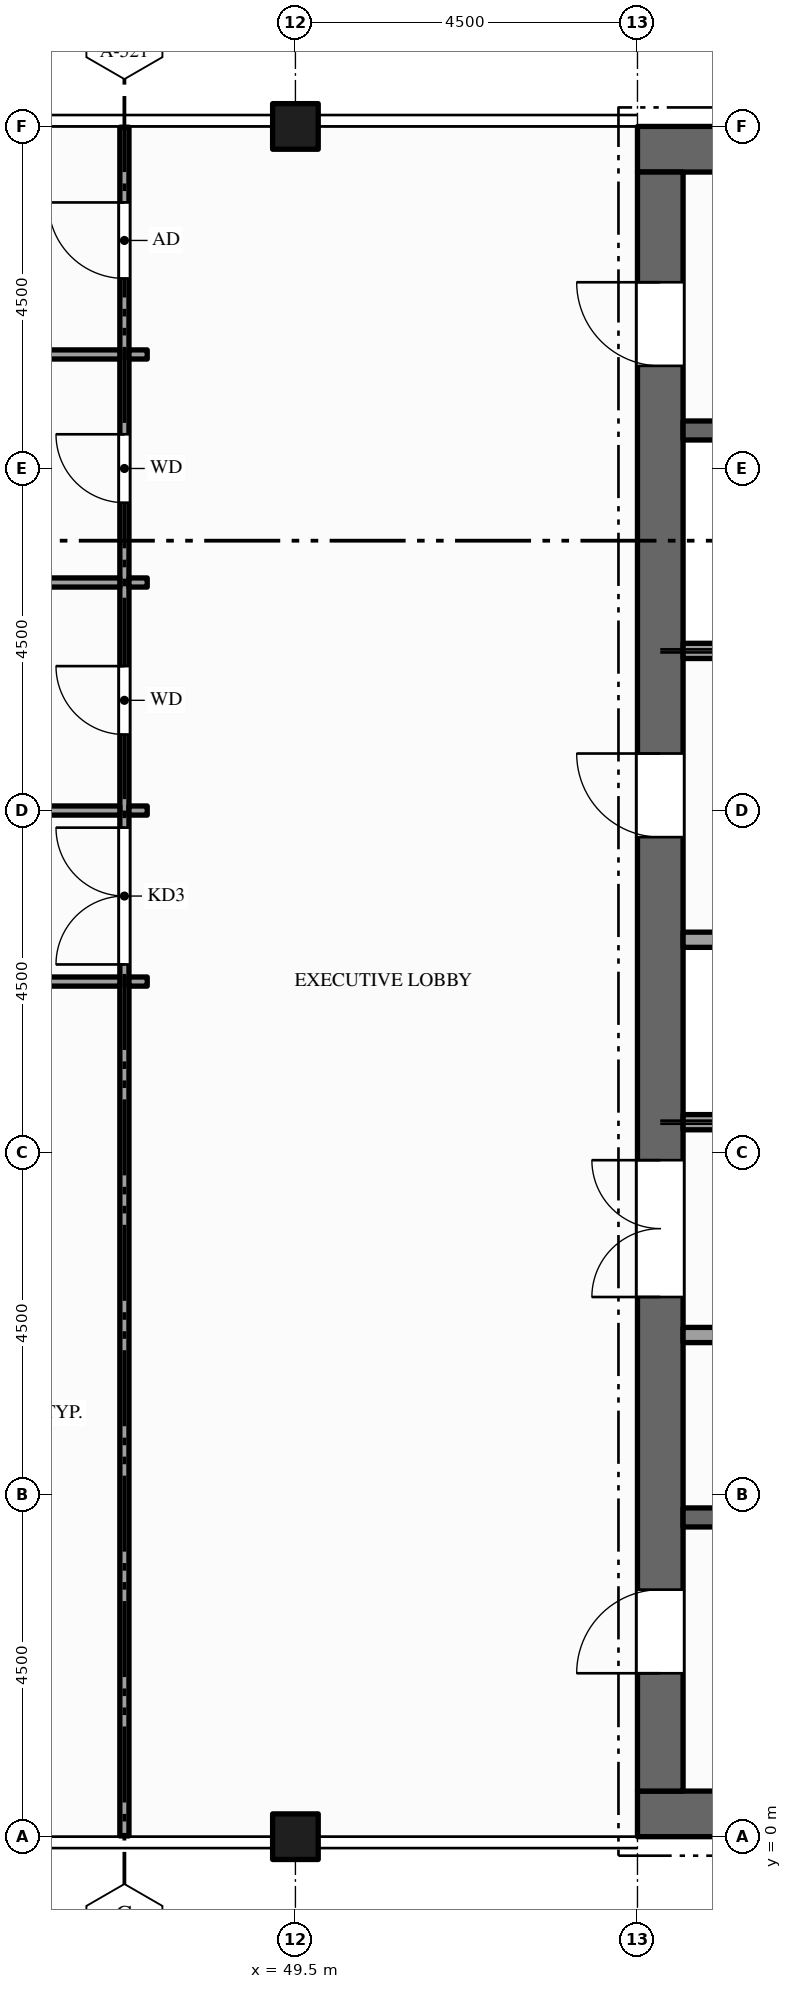
"""IFC4 building model, lengths in metres.
Left out: names, types, materials, properties, quantities, classifications, styles, units other than length and angle.
Written with IfcOpenShell. Run it as: python <this file> out.ifc"""

import sys

from ifc_helpers import new_model, si_unit, direction, frame, frame_2d, origin, origin_2d, place, context, subcontext, project, spatial, rectangle, hollow_rectangle, extrude, element, fill, save


model = new_model("IFC4")
c1 = context("Model", 3, precision=1e-05, world=origin(), true_north=direction((0.0, 1.0)))
c2 = subcontext(c1, "Body", "Model", "MODEL_VIEW")
j1 = project(units=[si_unit("LENGTHUNIT", "METRE"), si_unit("PLANEANGLEUNIT", "RADIAN")], contexts=[c1])
p1 = place(None, origin())
s1 = spatial("IfcSite", under=j1, at=p1, CompositionType="ELEMENT")
p2 = place(p1, origin())
s2 = spatial("IfcBuilding", under=s1, at=p2, CompositionType="ELEMENT")
p3 = place(p2, frame((0.0, 0.0, 318.5)))
s3 = spatial("IfcBuildingStorey", under=s2, at=p3, CompositionType="ELEMENT", Elevation=318.5)
for number, where, z_axis, x_axis in (
    (1, (67.5, 0.3, -0.15), (0.0, 0.0, 1.0), (-1.0, 0.0, 0.0)),
    (2, (54.0, 22.2, -0.15), (0.0, 0.0, 1.0), (1.0, 0.0, 0.0)),
):
    element("IfcWall", number, at=place(p3, frame(where, z_axis=z_axis, x_axis=x_axis)), inside=s3, PredefinedType="SHEAR", context=c2, shape_type="SweptSolid", body=[
        extrude(rectangle(XDim=13.5, YDim=0.6, at=frame_2d((6.75, 0.0))), origin(), (0.0, 0.0, 1.0), 4.5),
    ])
p4 = place(p3, frame((54.3, 0.6, -0.15), z_axis=(0.0, 0.0, 1.0), x_axis=(0.0, 1.0, 0.0)))
e3 = element("IfcWall", 3, at=p4, inside=s3, PredefinedType="SHEAR", context=c2, shape_type="SweptSolid", body=[
    extrude(rectangle(XDim=21.3, YDim=0.6, at=frame_2d((10.65, 0.0))), origin(), (0.0, 0.0, 1.0), 4.5),
])
p5 = place(p4, frame((6.5, 0.0, 0.15)))
e4 = element("IfcOpeningElement", 4, at=p5, cuts=e3, PredefinedType="OPENING", context=c2, shape_type="SweptSolid", body=[
    extrude(rectangle(XDim=1.8, YDim=2.1, at=frame_2d((0.9, 1.05))), frame((0.0, 0.31, 0.0), z_axis=(0.0, -1.0, 0.0), x_axis=(1.0, 0.0, 0.0)), (0.0, 0.0, 1.0), 0.62),
])
p6 = place(p4, frame((12.55, 0.0, 0.15)))
e5 = element("IfcOpeningElement", 5, at=p6, cuts=e3, PredefinedType="OPENING", context=c2, shape_type="SweptSolid", body=[
    extrude(rectangle(XDim=1.1, YDim=2.1, at=frame_2d((0.55, 1.05))), frame((0.0, 0.31, 0.0), z_axis=(0.0, -1.0, 0.0), x_axis=(1.0, 0.0, 0.0)), (0.0, 0.0, 1.0), 0.62),
])
p7 = place(p4, frame((1.55, 0.0, 0.15)))
e6 = element("IfcOpeningElement", 6, at=p7, cuts=e3, PredefinedType="OPENING", context=c2, shape_type="SweptSolid", body=[
    extrude(rectangle(XDim=1.1, YDim=2.1, at=frame_2d((0.55, 1.05))), frame((0.0, 0.31, 0.0), z_axis=(0.0, -1.0, 0.0), x_axis=(1.0, 0.0, 0.0)), (0.0, 0.0, 1.0), 0.62),
])
p8 = place(p4, frame((18.75, 0.0, 0.15)))
e7 = element("IfcOpeningElement", 7, at=p8, cuts=e3, PredefinedType="OPENING", context=c2, shape_type="SweptSolid", body=[
    extrude(rectangle(XDim=1.1, YDim=2.1, at=frame_2d((0.55, 1.05))), frame((0.0, 0.31, 0.0), z_axis=(0.0, -1.0, 0.0), x_axis=(1.0, 0.0, 0.0)), (0.0, 0.0, 1.0), 0.62),
])
for number, where, z_axis, x_axis in (
    (8, (49.5, 0.0, -0.15), (0.0, 0.0, 1.0), (1.0, 0.0, 0.0)),
    (9, (49.5, 22.5, -0.15), (0.0, 0.0, 1.0), (1.0, 0.0, 0.0)),
):
    element("IfcColumn", number, at=place(p3, frame(where, z_axis=z_axis, x_axis=x_axis)), inside=s3, PredefinedType="COLUMN", context=c2, shape_type="SweptSolid", body=[
        extrude(hollow_rectangle(XDim=0.6, YDim=0.6, WallThickness=0.03, at=origin_2d()), origin(), (0.0, 0.0, 1.0), 4.5),
    ])
p9 = place(p3, frame((47.25, 0.01, 0.0), z_axis=(0.0, 0.0, 1.0), x_axis=(0.0, 1.0, 0.0)))
e10 = element("IfcWall", 10, at=p9, inside=s3, PredefinedType="PARTITIONING", context=c2, shape_type="SweptSolid", body=[
    extrude(rectangle(XDim=22.48, YDim=0.12, at=frame_2d((11.24, 0.0))), origin(), (0.0, 0.0, 1.0), 3.359),
])
p10 = place(p9, frame((11.465, 0.0, 0.0)))
e11 = element("IfcOpeningElement", 11, at=p10, cuts=e10, PredefinedType="OPENING", context=c2, shape_type="SweptSolid", body=[
    extrude(rectangle(XDim=1.8, YDim=2.1, at=frame_2d((0.9, 1.05))), frame((0.0, 0.07, 0.0), z_axis=(0.0, -1.0, 0.0), x_axis=(1.0, 0.0, 0.0)), (0.0, 0.0, 1.0), 0.14),
])
p11 = place(p9, frame((14.49, 0.0, 0.0)))
e12 = element("IfcOpeningElement", 12, at=p11, cuts=e10, PredefinedType="OPENING", context=c2, shape_type="SweptSolid", body=[
    extrude(rectangle(XDim=0.9, YDim=2.1, at=frame_2d((0.45, 1.05))), frame((0.0, 0.07, 0.0), z_axis=(0.0, -1.0, 0.0), x_axis=(1.0, 0.0, 0.0)), (0.0, 0.0, 1.0), 0.14),
])
p12 = place(p9, frame((17.54, 0.0, 0.0)))
e13 = element("IfcOpeningElement", 13, at=p12, cuts=e10, PredefinedType="OPENING", context=c2, shape_type="SweptSolid", body=[
    extrude(rectangle(XDim=0.9, YDim=2.1, at=frame_2d((0.45, 1.05))), frame((0.0, 0.07, 0.0), z_axis=(0.0, -1.0, 0.0), x_axis=(1.0, 0.0, 0.0)), (0.0, 0.0, 1.0), 0.14),
])
p13 = place(p9, frame((20.49, 0.0, 0.0)))
e14 = element("IfcOpeningElement", 14, at=p13, cuts=e10, PredefinedType="OPENING", context=c2, shape_type="SweptSolid", body=[
    extrude(rectangle(XDim=1.0, YDim=2.1, at=frame_2d((0.5, 1.05))), frame((0.0, 0.07, 0.0), z_axis=(0.0, -1.0, 0.0), x_axis=(1.0, 0.0, 0.0)), (0.0, 0.0, 1.0), 0.14),
])
p14 = place(p3, frame((54.6, 4.2, 0.0), z_axis=(0.0, 0.0, 1.0), x_axis=(1.0, 0.0, 0.0)))
e15 = element("IfcWall", 15, at=p14, inside=s3, PredefinedType="SHEAR", context=c2, shape_type="SweptSolid", body=[
    extrude(rectangle(XDim=6.675, YDim=0.25, at=frame_2d((3.337, 0.0))), origin(), (0.0, 0.0, 1.0), 4.35),
])
p15 = place(p3, frame((54.6, 6.6, 0.0), z_axis=(0.0, 0.0, 1.0), x_axis=(1.0, 0.0, 0.0)))
e16 = element("IfcWall", 16, at=p15, inside=s3, PredefinedType="PARTITIONING", context=c2, shape_type="SweptSolid", body=[
    extrude(rectangle(XDim=2.7, YDim=0.2, at=frame_2d((1.35, 0.0))), origin(), (0.0, 0.0, 1.0), 4.35),
])
p16 = place(p15, frame((0.9, 0.0, 0.0)))
e17 = element("IfcOpeningElement", 17, at=p16, cuts=e16, PredefinedType="OPENING", context=c2, shape_type="SweptSolid", body=[
    extrude(rectangle(XDim=0.9, YDim=2.1, at=frame_2d((0.45, 1.05))), frame((0.0, 0.11, 0.0), z_axis=(0.0, -1.0, 0.0), x_axis=(1.0, 0.0, 0.0)), (0.0, 0.0, 1.0), 0.22),
])
p17 = place(p3, frame((54.6, 9.4, 0.0), z_axis=(0.0, 0.0, 1.0), x_axis=(1.0, 0.0, 0.0)))
e18 = element("IfcWall", 18, at=p17, inside=s3, PredefinedType="SOLIDWALL", context=c2, shape_type="SweptSolid", body=[
    extrude(rectangle(XDim=2.7, YDim=0.2, at=frame_2d((1.35, 0.0))), origin(), (0.0, 0.0, 1.0), 4.35),
])
p18 = place(p17, frame((0.8, 0.0, 0.012)))
e19 = element("IfcOpeningElement", 19, at=p18, cuts=e18, PredefinedType="OPENING", context=c2, shape_type="SweptSolid", body=[
    extrude(rectangle(XDim=1.1, YDim=2.1, at=frame_2d((0.55, 1.05))), frame((0.0, 0.11, 0.0), z_axis=(0.0, -1.0, 0.0), x_axis=(1.0, 0.0, 0.0)), (0.0, 0.0, 1.0), 0.22),
])
p19 = place(p3, frame((38.31, 11.25, 0.0), z_axis=(0.0, 0.0, 1.0), x_axis=(1.0, 0.0, 0.0)))
e20 = element("IfcWall", 20, at=p19, inside=s3, PredefinedType="PARTITIONING", context=c2, shape_type="SweptSolid", body=[
    extrude(rectangle(XDim=8.88, YDim=0.12, at=frame_2d((4.44, 0.0))), origin(), (0.0, 0.0, 1.0), 3.359),
])
p20 = place(p19, frame((3.84, 0.0, 0.0)))
e21 = element("IfcOpeningElement", 21, at=p20, cuts=e20, PredefinedType="OPENING", context=c2, shape_type="SweptSolid", body=[
    extrude(rectangle(XDim=1.2, YDim=2.1, at=frame_2d((0.6, 1.05))), frame((0.0, 0.07, 0.0), z_axis=(0.0, -1.0, 0.0), x_axis=(1.0, 0.0, 0.0)), (0.0, 0.0, 1.0), 0.14),
])
p21 = place(p3, frame((47.31, 11.25, 0.0), z_axis=(0.0, 0.0, 1.0), x_axis=(1.0, 0.0, 0.0)))
e22 = element("IfcWall", 22, at=p21, inside=s3, PredefinedType="PARTITIONING", context=c2, shape_type="SweptSolid", body=[
    extrude(rectangle(XDim=0.24, YDim=0.12, at=frame_2d((0.12, 0.0))), origin(), (0.0, 0.0, 1.0), 3.359),
])
p22 = place(p3, frame((54.6, 11.8, 0.0), z_axis=(0.0, 0.0, 1.0), x_axis=(1.0, 0.0, 0.0)))
e23 = element("IfcWall", 23, at=p22, inside=s3, PredefinedType="SOLIDWALL", context=c2, shape_type="SweptSolid", body=[
    extrude(rectangle(XDim=2.7, YDim=0.2, at=frame_2d((1.35, 0.0))), origin(), (0.0, 0.0, 1.0), 4.35),
])
p23 = place(p3, frame((42.81, 13.5, 0.0), z_axis=(0.0, 0.0, 1.0), x_axis=(1.0, 0.0, 0.0)))
e24 = element("IfcWall", 24, at=p23, inside=s3, PredefinedType="PARTITIONING", context=c2, shape_type="SweptSolid", body=[
    extrude(rectangle(XDim=4.38, YDim=0.12, at=frame_2d((2.19, 0.0))), origin(), (0.0, 0.0, 1.0), 3.359),
])
p24 = place(p3, frame((47.31, 13.5, 0.0), z_axis=(0.0, 0.0, 1.0), x_axis=(1.0, 0.0, 0.0)))
e25 = element("IfcWall", 25, at=p24, inside=s3, PredefinedType="PARTITIONING", context=c2, shape_type="SweptSolid", body=[
    extrude(rectangle(XDim=0.24, YDim=0.12, at=frame_2d((0.12, 0.0))), origin(), (0.0, 0.0, 1.0), 3.359),
])
p25 = place(p3, frame((54.6, 15.6, 0.0), z_axis=(0.0, 0.0, 1.0), x_axis=(1.0, 0.0, 0.0)))
e26 = element("IfcWall", 26, at=p25, inside=s3, PredefinedType="SOLIDWALL", context=c2, shape_type="SweptSolid", body=[
    extrude(rectangle(XDim=2.7, YDim=0.2, at=frame_2d((1.35, 0.0))), origin(), (0.0, 0.0, 1.0), 4.35),
])
p26 = place(p25, frame((0.8, 0.0, 0.012)))
e27 = element("IfcOpeningElement", 27, at=p26, cuts=e26, PredefinedType="OPENING", context=c2, shape_type="SweptSolid", body=[
    extrude(rectangle(XDim=1.1, YDim=2.1, at=frame_2d((0.55, 1.05))), frame((0.0, 0.11, 0.0), z_axis=(0.0, -1.0, 0.0), x_axis=(1.0, 0.0, 0.0)), (0.0, 0.0, 1.0), 0.22),
])
p27 = place(p3, frame((42.81, 16.5, 0.0), z_axis=(0.0, 0.0, 1.0), x_axis=(1.0, 0.0, 0.0)))
e28 = element("IfcWall", 28, at=p27, inside=s3, PredefinedType="PARTITIONING", context=c2, shape_type="SweptSolid", body=[
    extrude(rectangle(XDim=4.38, YDim=0.12, at=frame_2d((2.19, 0.0))), origin(), (0.0, 0.0, 1.0), 3.359),
])
p28 = place(p3, frame((47.31, 16.5, 0.0), z_axis=(0.0, 0.0, 1.0), x_axis=(1.0, 0.0, 0.0)))
e29 = element("IfcWall", 29, at=p28, inside=s3, PredefinedType="PARTITIONING", context=c2, shape_type="SweptSolid", body=[
    extrude(rectangle(XDim=0.24, YDim=0.12, at=frame_2d((0.12, 0.0))), origin(), (0.0, 0.0, 1.0), 3.359),
])
p29 = place(p3, frame((54.6, 18.5, 0.0), z_axis=(0.0, 0.0, 1.0), x_axis=(1.0, 0.0, 0.0)))
e30 = element("IfcWall", 30, at=p29, inside=s3, PredefinedType="SHEAR", context=c2, shape_type="SweptSolid", body=[
    extrude(rectangle(XDim=6.675, YDim=0.25, at=frame_2d((3.337, 0.0))), origin(), (0.0, 0.0, 1.0), 4.35),
])
p30 = place(p3, frame((42.81, 19.5, 0.0), z_axis=(0.0, 0.0, 1.0), x_axis=(1.0, 0.0, 0.0)))
e31 = element("IfcWall", 31, at=p30, inside=s3, PredefinedType="PARTITIONING", context=c2, shape_type="SweptSolid", body=[
    extrude(rectangle(XDim=4.38, YDim=0.12, at=frame_2d((2.19, 0.0))), origin(), (0.0, 0.0, 1.0), 3.359),
])
p31 = place(p3, frame((47.31, 19.5, 0.0), z_axis=(0.0, 0.0, 1.0), x_axis=(1.0, 0.0, 0.0)))
e32 = element("IfcWall", 32, at=p31, inside=s3, PredefinedType="PARTITIONING", context=c2, shape_type="SweptSolid", body=[
    extrude(rectangle(XDim=0.24, YDim=0.12, at=frame_2d((0.12, 0.0))), origin(), (0.0, 0.0, 1.0), 3.359),
])
p32 = place(p5, origin())
e33 = element("IfcDoor", 33, at=p32, inside=s3, OperationType="DOUBLE_DOOR_SINGLE_SWING", PredefinedType="DOOR", context=c2, shape_type="SweptSolid", body=[
    extrude(rectangle(XDim=1.8, YDim=2.1, at=frame_2d((0.9, 1.05))), frame((0.0, 0.025, 0.0), z_axis=(0.0, -1.0, 0.0), x_axis=(1.0, 0.0, 0.0)), (0.0, 0.0, 1.0), 0.05),
])
fill(e4, e33)
p33 = place(p6, origin())
e34 = element("IfcDoor", 34, at=p33, inside=s3, OperationType="SINGLE_SWING_RIGHT", PredefinedType="DOOR", context=c2, shape_type="SweptSolid", body=[
    extrude(rectangle(XDim=1.1, YDim=2.1, at=frame_2d((0.55, 1.05))), frame((0.0, 0.025, 0.0), z_axis=(0.0, -1.0, 0.0), x_axis=(1.0, 0.0, 0.0)), (0.0, 0.0, 1.0), 0.05),
])
fill(e5, e34)
p34 = place(p7, origin())
e35 = element("IfcDoor", 35, at=p34, inside=s3, OperationType="SINGLE_SWING_LEFT", PredefinedType="DOOR", context=c2, shape_type="SweptSolid", body=[
    extrude(rectangle(XDim=1.1, YDim=2.1, at=frame_2d((0.55, 1.05))), frame((0.0, 0.025, 0.0), z_axis=(0.0, -1.0, 0.0), x_axis=(1.0, 0.0, 0.0)), (0.0, 0.0, 1.0), 0.05),
])
fill(e6, e35)
p35 = place(p8, origin())
e36 = element("IfcDoor", 36, at=p35, inside=s3, OperationType="SINGLE_SWING_RIGHT", PredefinedType="DOOR", context=c2, shape_type="SweptSolid", body=[
    extrude(rectangle(XDim=1.1, YDim=2.1, at=frame_2d((0.55, 1.05))), frame((0.0, 0.025, 0.0), z_axis=(0.0, -1.0, 0.0), x_axis=(1.0, 0.0, 0.0)), (0.0, 0.0, 1.0), 0.05),
])
fill(e7, e36)
p36 = place(p10, origin())
e37 = element("IfcDoor", 37, at=p36, inside=s3, OperationType="DOUBLE_DOOR_SINGLE_SWING", PredefinedType="DOOR", context=c2, shape_type="SweptSolid", body=[
    extrude(rectangle(XDim=1.8, YDim=2.1, at=frame_2d((0.9, 1.05))), frame((0.0, 0.025, 0.0), z_axis=(0.0, -1.0, 0.0), x_axis=(1.0, 0.0, 0.0)), (0.0, 0.0, 1.0), 0.05),
])
fill(e11, e37)
p37 = place(p11, origin())
e38 = element("IfcDoor", 38, at=p37, inside=s3, OperationType="SINGLE_SWING_RIGHT", PredefinedType="DOOR", context=c2, shape_type="SweptSolid", body=[
    extrude(rectangle(XDim=0.9, YDim=2.1, at=frame_2d((0.45, 1.05))), frame((0.0, 0.025, 0.0), z_axis=(0.0, -1.0, 0.0), x_axis=(1.0, 0.0, 0.0)), (0.0, 0.0, 1.0), 0.05),
])
fill(e12, e38)
p38 = place(p12, origin())
e39 = element("IfcDoor", 39, at=p38, inside=s3, OperationType="SINGLE_SWING_RIGHT", PredefinedType="DOOR", context=c2, shape_type="SweptSolid", body=[
    extrude(rectangle(XDim=0.9, YDim=2.1, at=frame_2d((0.45, 1.05))), frame((0.0, 0.025, 0.0), z_axis=(0.0, -1.0, 0.0), x_axis=(1.0, 0.0, 0.0)), (0.0, 0.0, 1.0), 0.05),
])
fill(e13, e39)
p39 = place(p13, origin())
e40 = element("IfcDoor", 40, at=p39, inside=s3, OperationType="SINGLE_SWING_RIGHT", PredefinedType="DOOR", context=c2, shape_type="SweptSolid", body=[
    extrude(rectangle(XDim=1.0, YDim=2.1, at=frame_2d((0.5, 1.05))), frame((0.0, 0.025, 0.0), z_axis=(0.0, -1.0, 0.0), x_axis=(1.0, 0.0, 0.0)), (0.0, 0.0, 1.0), 0.05),
])
fill(e14, e40)
save(model, sys.argv[1])
